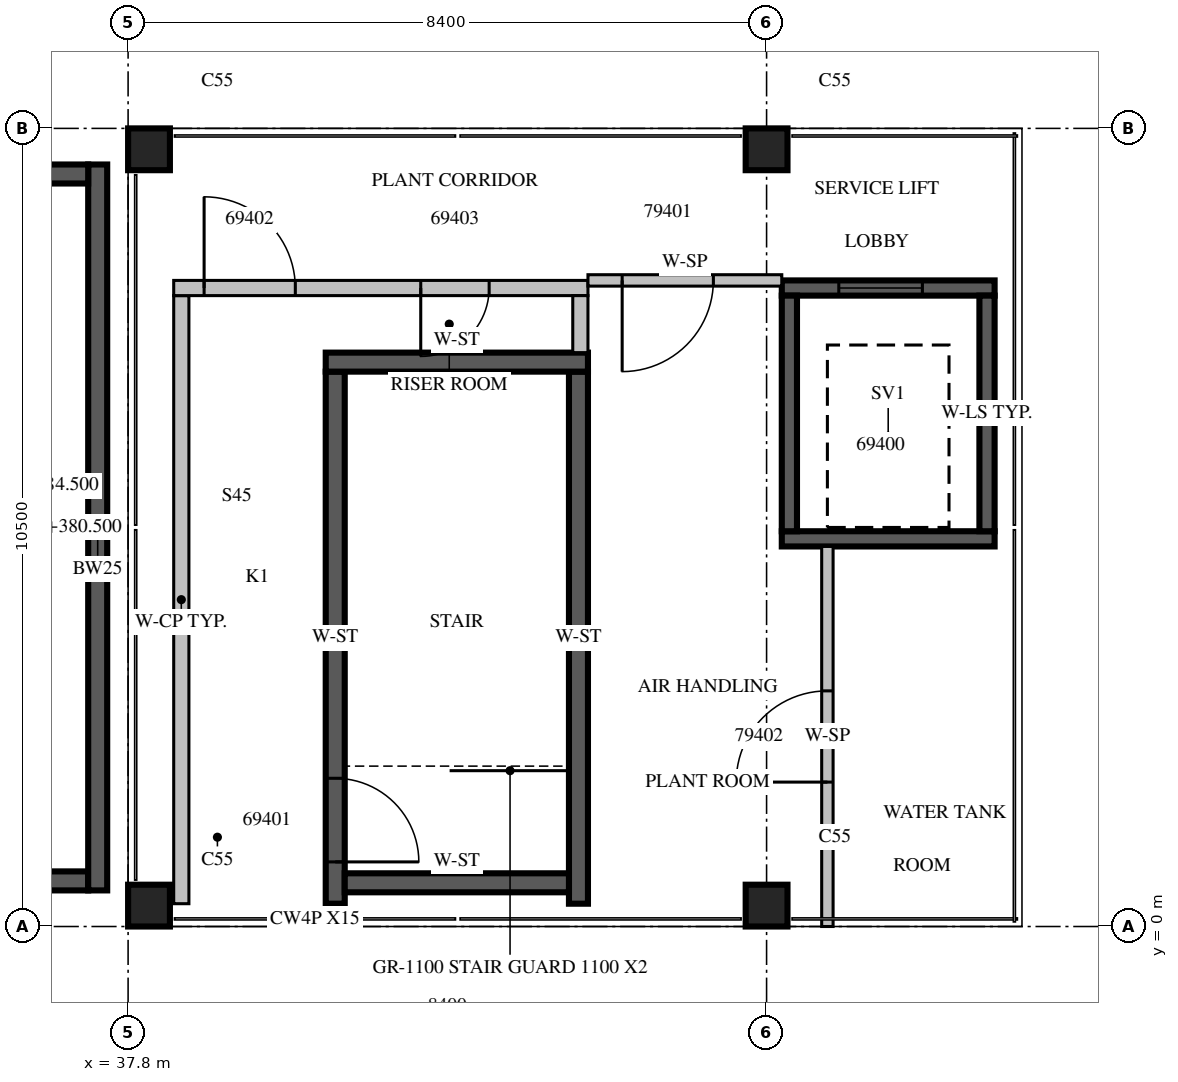
"""IFC4 building model, lengths in metres.
Left out: names, types, materials, properties, quantities, classifications, styles, units other than length and angle.
Written with IfcOpenShell. Run it as: python <this file> out.ifc"""

import sys

from ifc_helpers import new_model, si_unit, direction, frame, frame_2d, origin, origin_2d, place, context, subcontext, project, spatial, rectangle, extrude, source, transform, mapped, element, fill, save


model = new_model("IFC4")
c1 = context("Model", 3, precision=1e-05, world=origin(), true_north=direction((0.0, 1.0)))
c2 = subcontext(c1, "Body", "Model", "MODEL_VIEW")
j1 = project(units=[si_unit("LENGTHUNIT", "METRE"), si_unit("PLANEANGLEUNIT", "RADIAN")], contexts=[c1])
p1 = place(None, origin())
s1 = spatial("IfcSite", under=j1, at=p1, CompositionType="ELEMENT")
p2 = place(p1, origin())
s2 = spatial("IfcBuilding", under=s1, at=p2, CompositionType="ELEMENT")
p3 = place(p2, frame((0.0, 0.0, 380.5)))
s3 = spatial("IfcBuildingStorey", under=s2, at=p3, CompositionType="ELEMENT", Elevation=380.5)
m1 = source(origin(), c2, "Body", "SweptSolid", [
    extrude(rectangle(XDim=0.55, YDim=0.55, at=origin_2d()), origin(), (0.0, 0.0, 1.0), 4.0),
])
for number, where, z_axis, x_axis in (
    (1, (38.075, 0.275, 0.0), (0.0, 0.0, 1.0), (1.0, 0.0, 0.0)),
    (2, (46.2, 0.275, 0.0), (0.0, 0.0, 1.0), (1.0, 0.0, 0.0)),
    (3, (38.075, 10.225, 0.0), (0.0, 0.0, 1.0), (1.0, 0.0, 0.0)),
    (4, (46.2, 10.225, 0.0), (0.0, 0.0, 1.0), (1.0, 0.0, 0.0)),
):
    element("IfcColumn", number, at=place(p3, frame(where, z_axis=z_axis, x_axis=x_axis)), inside=s3, PredefinedType="COLUMN", context=c2, shape_type="MappedRepresentation", body=[
        mapped(m1, transform((0.0, 0.0, 0.0), scale=1.0)),
    ])
m2 = source(origin(), c2, "Body", "SweptSolid", [
    extrude(rectangle(XDim=2.033, YDim=0.25, at=frame_2d((1.016, 0.0))), origin(), (0.0, 0.0, 1.0), 3.55),
])
p4 = place(p3, frame((35.242, 0.6, 0.0), z_axis=(0.0, 0.0, 1.0), x_axis=(1.0, 0.0, 0.0)))
e5 = element("IfcWall", 5, at=p4, inside=s3, PredefinedType="SOLIDWALL", context=c2, shape_type="MappedRepresentation", body=[
    mapped(m2, transform((0.0, 0.0, 0.0), scale=1.0)),
])
p5 = place(p3, frame((37.4, 0.475, 0.0), z_axis=(0.0, 0.0, 1.0), x_axis=(0.0, 1.0, 0.0)))
e6 = element("IfcWall", 6, at=p5, inside=s3, PredefinedType="SOLIDWALL", context=c2, shape_type="SweptSolid", body=[
    extrude(rectangle(XDim=9.55, YDim=0.25, at=frame_2d((4.775, 0.0))), origin(), (0.0, 0.0, 1.0), 3.55),
])
p6 = place(p3, frame((37.275, 9.9, 0.0), z_axis=(0.0, 0.0, 1.0), x_axis=(-1.0, 0.0, 0.0)))
e7 = element("IfcWall", 7, at=p6, inside=s3, PredefinedType="SOLIDWALL", context=c2, shape_type="MappedRepresentation", body=[
    mapped(m2, transform((0.0, 0.0, 0.0), scale=1.0)),
])
p7 = place(p3, frame((46.4, 5.1, 0.0), z_axis=(0.0, 0.0, 1.0), x_axis=(1.0, 0.0, 0.0)))
e8 = element("IfcWall", 8, at=p7, inside=s3, PredefinedType="SOLIDWALL", context=c2, shape_type="SweptSolid", body=[
    extrude(rectangle(XDim=2.8, YDim=0.2, at=frame_2d((1.4, 0.0))), origin(), (0.0, 0.0, 1.0), 3.55),
])
m3 = source(origin(), c2, "Body", "SweptSolid", [
    extrude(rectangle(XDim=2.8, YDim=0.2, at=frame_2d((1.4, 0.0))), origin(), (0.0, 0.0, 1.0), 3.55),
])
p8 = place(p3, frame((46.4, 8.4, 0.0), z_axis=(0.0, 0.0, 1.0), x_axis=(1.0, 0.0, 0.0)))
e9 = element("IfcWall", 9, at=p8, inside=s3, PredefinedType="SOLIDWALL", context=c2, shape_type="MappedRepresentation", body=[
    mapped(m3, transform((0.0, 0.0, 0.0), scale=1.0)),
])
m4 = source(origin(), c2, "Body", "SweptSolid", [
    extrude(rectangle(XDim=1.1, YDim=2.1, at=frame_2d((0.55, 1.05))), frame((0.0, 0.11, 0.0), z_axis=(0.0, -1.0, 0.0), x_axis=(1.0, 0.0, 0.0)), (0.0, 0.0, 1.0), 0.22),
])
p9 = place(p8, frame((0.75, 0.0, 0.0)))
e10 = element("IfcOpeningElement", 10, at=p9, cuts=e9, PredefinedType="OPENING", context=c2, shape_type="MappedRepresentation", body=[
    mapped(m4, transform((0.0, 0.0, 0.0), scale=1.0)),
])
m5 = source(origin(), c2, "Body", "SweptSolid", [
    extrude(rectangle(XDim=3.1, YDim=0.2, at=frame_2d((1.55, 0.0))), origin(), (0.0, 0.0, 1.0), 3.55),
])
for number, where, z_axis, x_axis in (
    (11, (46.5, 5.2, 0.0), (0.0, 0.0, 1.0), (0.0, 1.0, 0.0)),
    (12, (49.1, 5.2, 0.0), (0.0, 0.0, 1.0), (0.0, 1.0, 0.0)),
):
    element("IfcWall", number, at=place(p3, frame(where, z_axis=z_axis, x_axis=x_axis)), inside=s3, PredefinedType="SOLIDWALL", context=c2, shape_type="MappedRepresentation", body=[
        mapped(m5, transform((0.0, 0.0, 0.0), scale=1.0)),
    ])
m6 = source(origin(), c2, "Body", "SweptSolid", [
    extrude(rectangle(XDim=7.0, YDim=0.25, at=frame_2d((3.5, 0.0))), origin(), (0.0, 0.0, 1.0), 3.55),
])
p10 = place(p3, frame((40.525, 0.3, 0.0), z_axis=(0.0, 0.0, 1.0), x_axis=(0.0, 1.0, 0.0)))
e13 = element("IfcWall", 13, at=p10, inside=s3, PredefinedType="SOLIDWALL", context=c2, shape_type="MappedRepresentation", body=[
    mapped(m6, transform((0.0, 0.0, 0.0), scale=1.0)),
])
m7 = source(origin(), c2, "Body", "SweptSolid", [
    extrude(rectangle(XDim=1.1, YDim=2.1, at=frame_2d((0.55, 1.05))), frame((0.0, 0.135, 0.0), z_axis=(0.0, -1.0, 0.0), x_axis=(1.0, 0.0, 0.0)), (0.0, 0.0, 1.0), 0.27),
])
p11 = place(p10, frame((0.55, 0.0, 0.0)))
e14 = element("IfcOpeningElement", 14, at=p11, cuts=e13, PredefinedType="OPENING", context=c2, shape_type="MappedRepresentation", body=[
    mapped(m7, transform((0.0, 0.0, 0.0), scale=1.0)),
])
p12 = place(p3, frame((43.725, 0.3, 0.0), z_axis=(0.0, 0.0, 1.0), x_axis=(0.0, 1.0, 0.0)))
e15 = element("IfcWall", 15, at=p12, inside=s3, PredefinedType="SOLIDWALL", context=c2, shape_type="MappedRepresentation", body=[
    mapped(m6, transform((0.0, 0.0, 0.0), scale=1.0)),
])
m8 = source(origin(), c2, "Body", "SweptSolid", [
    extrude(rectangle(XDim=3.45, YDim=0.25, at=frame_2d((1.725, 0.0))), origin(), (0.0, 0.0, 1.0), 3.55),
])
p13 = place(p3, frame((40.4, 7.425, 0.0), z_axis=(0.0, 0.0, 1.0), x_axis=(1.0, 0.0, 0.0)))
e16 = element("IfcWall", 16, at=p13, inside=s3, PredefinedType="SOLIDWALL", context=c2, shape_type="MappedRepresentation", body=[
    mapped(m8, transform((0.0, 0.0, 0.0), scale=1.0)),
])
m9 = source(origin(), c2, "Body", "SweptSolid", [
    extrude(rectangle(XDim=2.95, YDim=0.25, at=frame_2d((1.475, 0.0))), origin(), (0.0, 0.0, 1.0), 3.55),
])
p14 = place(p3, frame((40.65, 0.575, 0.0), z_axis=(0.0, 0.0, 1.0), x_axis=(1.0, 0.0, 0.0)))
e17 = element("IfcWall", 17, at=p14, inside=s3, PredefinedType="SOLIDWALL", context=c2, shape_type="MappedRepresentation", body=[
    mapped(m9, transform((0.0, 0.0, 0.0), scale=1.0)),
])
m10 = source(origin(), c2, "Body", "SweptSolid", [
    extrude(rectangle(XDim=8.0, YDim=0.2, at=frame_2d((4.0, 0.0))), origin(), (0.0, 0.0, 1.0), 3.55),
])
p15 = place(p3, frame((38.5, 0.3, 0.0), z_axis=(0.0, 0.0, 1.0), x_axis=(0.0, 1.0, 0.0)))
e18 = element("IfcWall", 18, at=p15, inside=s3, PredefinedType="PARTITIONING", context=c2, shape_type="MappedRepresentation", body=[
    mapped(m10, transform((0.0, 0.0, 0.0), scale=1.0)),
])
m11 = source(origin(), c2, "Body", "SweptSolid", [
    extrude(rectangle(XDim=5.45, YDim=0.2, at=frame_2d((2.725, 0.0))), origin(), (0.0, 0.0, 1.0), 3.55),
])
p16 = place(p3, frame((38.4, 8.4, 0.0), z_axis=(0.0, 0.0, 1.0), x_axis=(1.0, 0.0, 0.0)))
e19 = element("IfcWall", 19, at=p16, inside=s3, PredefinedType="PARTITIONING", context=c2, shape_type="MappedRepresentation", body=[
    mapped(m11, transform((0.0, 0.0, 0.0), scale=1.0)),
])
m12 = source(origin(), c2, "Body", "SweptSolid", [
    extrude(rectangle(XDim=1.2, YDim=2.1, at=frame_2d((0.6, 1.05))), frame((0.0, 0.11, 0.0), z_axis=(0.0, -1.0, 0.0), x_axis=(1.0, 0.0, 0.0)), (0.0, 0.0, 1.0), 0.22),
])
p17 = place(p16, frame((0.4, 0.0, 0.0)))
e20 = element("IfcOpeningElement", 20, at=p17, cuts=e19, PredefinedType="OPENING", context=c2, shape_type="MappedRepresentation", body=[
    mapped(m12, transform((0.0, 0.0, 0.0), scale=1.0)),
])
m13 = source(origin(), c2, "Body", "SweptSolid", [
    extrude(rectangle(XDim=0.9, YDim=2.1, at=frame_2d((0.45, 1.05))), frame((0.0, 0.11, 0.0), z_axis=(0.0, -1.0, 0.0), x_axis=(1.0, 0.0, 0.0)), (0.0, 0.0, 1.0), 0.22),
])
p18 = place(p16, frame((3.25, 0.0, 0.0)))
e21 = element("IfcOpeningElement", 21, at=p18, cuts=e19, PredefinedType="OPENING", context=c2, shape_type="MappedRepresentation", body=[
    mapped(m13, transform((0.0, 0.0, 0.0), scale=1.0)),
])
m14 = source(origin(), c2, "Body", "SweptSolid", [
    extrude(rectangle(XDim=0.75, YDim=0.2, at=frame_2d((0.375, 0.0))), origin(), (0.0, 0.0, 1.0), 3.55),
])
p19 = place(p3, frame((43.75, 7.55, 0.0), z_axis=(0.0, 0.0, 1.0), x_axis=(0.0, 1.0, 0.0)))
e22 = element("IfcWall", 22, at=p19, inside=s3, PredefinedType="PARTITIONING", context=c2, shape_type="MappedRepresentation", body=[
    mapped(m14, transform((0.0, 0.0, 0.0), scale=1.0)),
])
m15 = source(origin(), c2, "Body", "SweptSolid", [
    extrude(rectangle(XDim=2.55, YDim=0.15, at=frame_2d((1.275, 0.0))), origin(), (0.0, 0.0, 1.0), 3.55),
])
p20 = place(p3, frame((43.85, 8.5, 0.0), z_axis=(0.0, 0.0, 1.0), x_axis=(1.0, 0.0, 0.0)))
e23 = element("IfcWall", 23, at=p20, inside=s3, PredefinedType="PARTITIONING", context=c2, shape_type="MappedRepresentation", body=[
    mapped(m15, transform((0.0, 0.0, 0.0), scale=1.0)),
])
m16 = source(origin(), c2, "Body", "SweptSolid", [
    extrude(rectangle(XDim=1.2, YDim=2.1, at=frame_2d((0.6, 1.05))), frame((0.0, 0.085, 0.0), z_axis=(0.0, -1.0, 0.0), x_axis=(1.0, 0.0, 0.0)), (0.0, 0.0, 1.0), 0.17),
])
p21 = place(p20, frame((0.45, 0.0, 0.0)))
e24 = element("IfcOpeningElement", 24, at=p21, cuts=e23, PredefinedType="OPENING", context=c2, shape_type="MappedRepresentation", body=[
    mapped(m16, transform((0.0, 0.0, 0.0), scale=1.0)),
])
m17 = source(origin(), c2, "Body", "SweptSolid", [
    extrude(rectangle(XDim=5.0, YDim=0.15, at=frame_2d((2.5, 0.0))), origin(), (0.0, 0.0, 1.0), 3.55),
])
p22 = place(p3, frame((47.0, 0.0, 0.0), z_axis=(0.0, 0.0, 1.0), x_axis=(0.0, 1.0, 0.0)))
e25 = element("IfcWall", 25, at=p22, inside=s3, PredefinedType="PARTITIONING", context=c2, shape_type="MappedRepresentation", body=[
    mapped(m17, transform((0.0, 0.0, 0.0), scale=1.0)),
])
p23 = place(p22, frame((1.9, 0.0, 0.0)))
e26 = element("IfcOpeningElement", 26, at=p23, cuts=e25, PredefinedType="OPENING", context=c2, shape_type="MappedRepresentation", body=[
    mapped(m16, transform((0.0, 0.0, 0.0), scale=1.0)),
])
m18 = source(origin(), c2, "Body", "SweptSolid", [
    extrude(rectangle(XDim=1.1, YDim=2.1, at=frame_2d((0.55, 1.05))), frame((0.0, 0.025, 0.0), z_axis=(0.0, -1.0, 0.0), x_axis=(1.0, 0.0, 0.0)), (0.0, 0.0, 1.0), 0.05),
])
p24 = place(p9, origin())
e27 = element("IfcDoor", 27, at=p24, inside=s3, OperationType="SLIDING_TO_LEFT", PredefinedType="DOOR", context=c2, shape_type="MappedRepresentation", body=[
    mapped(m18, transform((0.0, 0.0, 0.0), scale=1.0)),
])
fill(e10, e27)
p25 = place(p11, origin())
e28 = element("IfcDoor", 28, at=p25, inside=s3, OperationType="SINGLE_SWING_RIGHT", PredefinedType="DOOR", context=c2, shape_type="MappedRepresentation", body=[
    mapped(m18, transform((0.0, 0.0, 0.0), scale=1.0)),
])
fill(e14, e28)
m19 = source(origin(), c2, "Body", "SweptSolid", [
    extrude(rectangle(XDim=1.2, YDim=2.1, at=frame_2d((0.6, 1.05))), frame((0.0, 0.025, 0.0), z_axis=(0.0, -1.0, 0.0), x_axis=(1.0, 0.0, 0.0)), (0.0, 0.0, 1.0), 0.05),
])
p26 = place(p17, origin())
e29 = element("IfcDoor", 29, at=p26, inside=s3, OperationType="SINGLE_SWING_LEFT", PredefinedType="DOOR", context=c2, shape_type="MappedRepresentation", body=[
    mapped(m19, transform((0.0, 0.0, 0.0), scale=1.0)),
])
fill(e20, e29)
m20 = source(origin(), c2, "Body", "SweptSolid", [
    extrude(rectangle(XDim=0.9, YDim=2.1, at=frame_2d((0.45, 1.05))), frame((0.0, 0.025, 0.0), z_axis=(0.0, -1.0, 0.0), x_axis=(1.0, 0.0, 0.0)), (0.0, 0.0, 1.0), 0.05),
])
p27 = place(p18, origin())
e30 = element("IfcDoor", 30, at=p27, inside=s3, OperationType="SINGLE_SWING_RIGHT", PredefinedType="DOOR", context=c2, shape_type="MappedRepresentation", body=[
    mapped(m20, transform((0.0, 0.0, 0.0), scale=1.0)),
])
fill(e21, e30)
p28 = place(p21, origin())
e31 = element("IfcDoor", 31, at=p28, inside=s3, OperationType="SINGLE_SWING_RIGHT", PredefinedType="DOOR", context=c2, shape_type="MappedRepresentation", body=[
    mapped(m19, transform((0.0, 0.0, 0.0), scale=1.0)),
])
fill(e24, e31)
p29 = place(p23, origin())
e32 = element("IfcDoor", 32, at=p29, inside=s3, OperationType="SINGLE_SWING_LEFT", PredefinedType="DOOR", context=c2, shape_type="MappedRepresentation", body=[
    mapped(m19, transform((0.0, 0.0, 0.0), scale=1.0)),
])
fill(e26, e32)
save(model, sys.argv[1])
